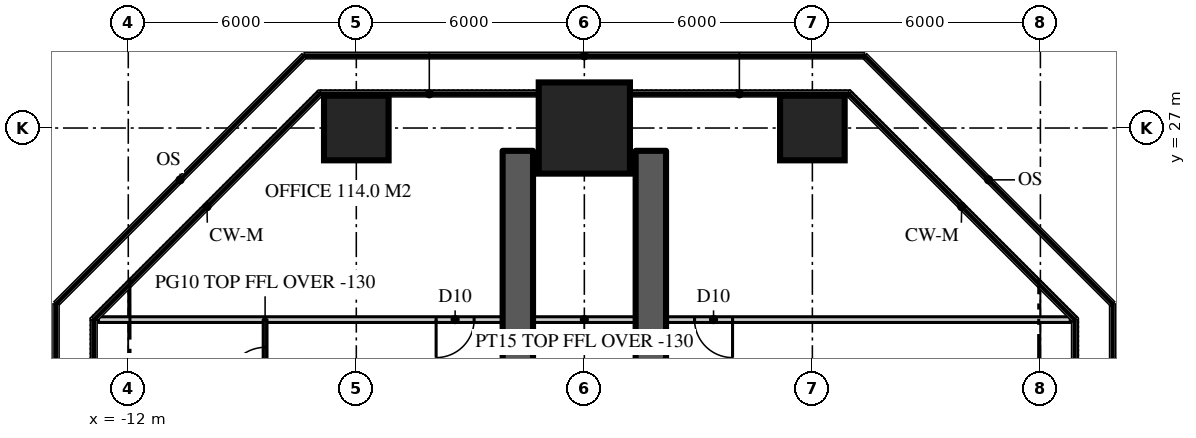
"""IFC4 building model, lengths in metres.
Left out: names, types, materials, properties, quantities, classifications, styles, units other than length and angle.
Written with IfcOpenShell. Run it as: python <this file> out.ifc"""

import sys

from ifc_helpers import new_model, si_unit, direction, frame, frame_2d, origin, origin_2d, place, context, subcontext, project, spatial, rectangle, extrude, element, fill, save


model = new_model("IFC4")
c1 = context("Model", 3, precision=1e-05, world=origin(), true_north=direction((0.0, 1.0)))
c2 = subcontext(c1, "Body", "Model", "MODEL_VIEW")
j1 = project(units=[si_unit("LENGTHUNIT", "METRE"), si_unit("PLANEANGLEUNIT", "RADIAN")], contexts=[c1])
p1 = place(None, origin())
s1 = spatial("IfcSite", under=j1, at=p1, CompositionType="ELEMENT")
p2 = place(p1, origin())
s2 = spatial("IfcBuilding", under=s1, at=p2, CompositionType="ELEMENT")
p3 = place(p2, frame((0.0, 0.0, 186.6)))
s3 = spatial("IfcBuildingStorey", under=s2, at=p3, CompositionType="ELEMENT", Elevation=186.6)
for number, where, z_axis, x_axis in (
    (1, (1.75, 11.15, 0.0), (0.0, 0.0, 1.0), (0.0, 1.0, 0.0)),
    (2, (-1.75, 11.15, 0.0), (0.0, 0.0, 1.0), (0.0, 1.0, 0.0)),
):
    element("IfcWall", number, at=place(p3, frame(where, z_axis=z_axis, x_axis=x_axis)), inside=s3, PredefinedType="SHEAR", context=c2, shape_type="SweptSolid", body=[
        extrude(rectangle(XDim=15.25, YDim=0.8, at=frame_2d((7.625, 0.0))), origin(), (0.0, 0.0, 1.0), 3.9),
    ])
p4 = place(p3, frame((-6.0, 27.0, 0.0), z_axis=(0.0, 0.0, 1.0), x_axis=(1.0, 0.0, 0.0)))
e3 = element("IfcColumn", 3, at=p4, inside=s3, PredefinedType="COLUMN", context=c2, shape_type="SweptSolid", body=[
    extrude(rectangle(XDim=1.7, YDim=1.7, at=origin_2d()), origin(), (0.0, 0.0, 1.0), 3.9),
])
p5 = place(p3, frame((0.0, 27.0, 0.0), z_axis=(0.0, 0.0, 1.0), x_axis=(1.0, 0.0, 0.0)))
e4 = element("IfcColumn", 4, at=p5, inside=s3, PredefinedType="COLUMN", context=c2, shape_type="SweptSolid", body=[
    extrude(rectangle(XDim=2.4, YDim=2.4, at=origin_2d()), origin(), (0.0, 0.0, 1.0), 3.9),
])
p6 = place(p3, frame((6.0, 27.0, 0.0), z_axis=(0.0, 0.0, 1.0), x_axis=(1.0, 0.0, 0.0)))
e5 = element("IfcColumn", 5, at=p6, inside=s3, PredefinedType="COLUMN", context=c2, shape_type="SweptSolid", body=[
    extrude(rectangle(XDim=1.7, YDim=1.7, at=origin_2d()), origin(), (0.0, 0.0, 1.0), 3.9),
])
p7 = place(p3, frame((12.786, 21.959, 0.0), z_axis=(0.0, 0.0, 1.0), x_axis=(-1.0, 0.0, 0.0)))
e6 = element("IfcWall", 6, at=p7, inside=s3, PredefinedType="PARTITIONING", context=c2, shape_type="SweptSolid", body=[
    extrude(rectangle(XDim=25.573, YDim=0.15, at=frame_2d((12.786, 0.0))), origin(), (0.0, 0.0, 1.0), 3.77),
])
p8 = place(p7, frame((15.687, 0.0, 0.0)))
e7 = element("IfcOpeningElement", 7, at=p8, cuts=e6, PredefinedType="OPENING", context=c2, shape_type="SweptSolid", body=[
    extrude(rectangle(XDim=1.0, YDim=2.2, at=frame_2d((0.5, 1.1))), frame((0.0, 0.085, 0.0), z_axis=(0.0, -1.0, 0.0), x_axis=(1.0, 0.0, 0.0)), (0.0, 0.0, 1.0), 0.17),
])
p9 = place(p7, frame((8.886, 0.0, 0.0)))
e8 = element("IfcOpeningElement", 8, at=p9, cuts=e6, PredefinedType="OPENING", context=c2, shape_type="SweptSolid", body=[
    extrude(rectangle(XDim=1.0, YDim=2.2, at=frame_2d((0.5, 1.1))), frame((0.0, 0.085, 0.0), z_axis=(0.0, -1.0, 0.0), x_axis=(1.0, 0.0, 0.0)), (0.0, 0.0, 1.0), 0.17),
])
p10 = place(p3, frame((-8.4, 19.5, 0.0), z_axis=(0.0, 0.0, 1.0), x_axis=(0.0, 1.0, 0.0)))
e9 = element("IfcWall", 9, at=p10, inside=s3, PredefinedType="PARTITIONING", context=c2, shape_type="SweptSolid", body=[
    extrude(rectangle(XDim=2.459, YDim=0.1, at=frame_2d((1.229, 0.0))), origin(), (0.0, 0.0, 1.0), 3.77),
])
p11 = place(p10, frame((0.729, 0.0, 0.0)))
e10 = element("IfcOpeningElement", 10, at=p11, cuts=e9, PredefinedType="OPENING", context=c2, shape_type="SweptSolid", body=[
    extrude(rectangle(XDim=1.0, YDim=2.2, at=frame_2d((0.5, 1.1))), frame((0.0, 0.06, 0.0), z_axis=(0.0, -1.0, 0.0), x_axis=(1.0, 0.0, 0.0)), (0.0, 0.0, 1.0), 0.12),
])
p12 = place(p8, origin())
e11 = element("IfcDoor", 11, at=p12, inside=s3, OperationType="SINGLE_SWING_RIGHT", PredefinedType="DOOR", context=c2, shape_type="SweptSolid", body=[
    extrude(rectangle(XDim=1.0, YDim=2.2, at=frame_2d((0.5, 1.1))), frame((0.0, 0.025, 0.0), z_axis=(0.0, -1.0, 0.0), x_axis=(1.0, 0.0, 0.0)), (0.0, 0.0, 1.0), 0.05),
])
fill(e7, e11)
p13 = place(p9, origin())
e12 = element("IfcDoor", 12, at=p13, inside=s3, OperationType="SINGLE_SWING_LEFT", PredefinedType="DOOR", context=c2, shape_type="SweptSolid", body=[
    extrude(rectangle(XDim=1.0, YDim=2.2, at=frame_2d((0.5, 1.1))), frame((0.0, 0.025, 0.0), z_axis=(0.0, -1.0, 0.0), x_axis=(1.0, 0.0, 0.0)), (0.0, 0.0, 1.0), 0.05),
])
fill(e8, e12)
p14 = place(p11, origin())
e13 = element("IfcDoor", 13, at=p14, inside=s3, OperationType="SINGLE_SWING_LEFT", PredefinedType="DOOR", context=c2, shape_type="SweptSolid", body=[
    extrude(rectangle(XDim=1.0, YDim=2.2, at=frame_2d((0.5, 1.1))), frame((0.0, 0.025, 0.0), z_axis=(0.0, -1.0, 0.0), x_axis=(1.0, 0.0, 0.0)), (0.0, 0.0, 1.0), 0.05),
])
fill(e10, e13)
save(model, sys.argv[1])
